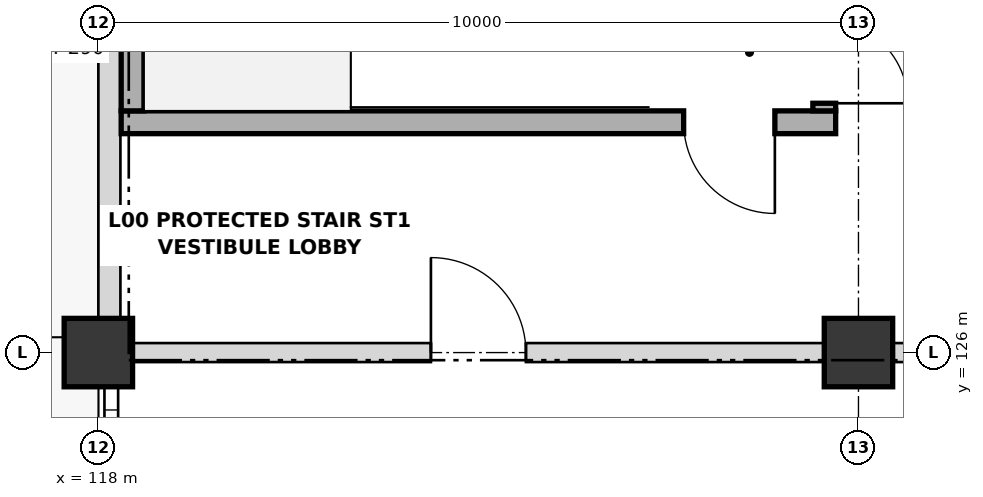
"""IFC4 building model, lengths in metres.
Left out: names, types, materials, properties, quantities, classifications, styles, units other than length and angle.
Written with IfcOpenShell. Run it as: python <this file> out.ifc"""

import sys

from ifc_helpers import new_model, si_unit, direction, frame, frame_2d, origin, origin_2d, place, context, subcontext, project, spatial, rectangle, extrude, element, fill, save


model = new_model("IFC4")
c1 = context("Model", 3, precision=1e-05, world=origin(), true_north=direction((0.0, 1.0)))
c2 = subcontext(c1, "Body", "Model", "MODEL_VIEW")
j1 = project(units=[si_unit("LENGTHUNIT", "METRE"), si_unit("PLANEANGLEUNIT", "RADIAN")], contexts=[c1])
p1 = place(None, origin())
s1 = spatial("IfcSite", under=j1, at=p1, CompositionType="ELEMENT")
p2 = place(p1, origin())
s2 = spatial("IfcBuilding", under=s1, at=p2, CompositionType="ELEMENT")
p3 = place(p2, origin())
s3 = spatial("IfcBuildingStorey", under=s2, at=p3, CompositionType="ELEMENT", Elevation=0.0)
for number, where, z_axis, x_axis in (
    (1, (118.0, 126.0, 0.0), (0.0, 0.0, 1.0), (1.0, 0.0, 0.0)),
    (2, (128.0, 126.0, 0.0), (0.0, 0.0, 1.0), (1.0, 0.0, 0.0)),
):
    element("IfcColumn", number, at=place(p3, frame(where, z_axis=z_axis, x_axis=x_axis)), inside=s3, PredefinedType="COLUMN", context=c2, shape_type="SweptSolid", body=[
        extrude(rectangle(XDim=0.9, YDim=0.9, at=origin_2d()), origin(), (0.0, 0.0, 1.0), 5.4),
    ])
p4 = place(p3, frame((118.145, 126.445, 0.0), z_axis=(0.0, 0.0, 1.0), x_axis=(0.0, 1.0, 0.0)))
e3 = element("IfcWall", 3, at=p4, inside=s3, PredefinedType="SOLIDWALL", context=c2, shape_type="SweptSolid", body=[
    extrude(rectangle(XDim=7.11, YDim=0.29, at=frame_2d((3.555, 0.0))), origin(), (0.0, 0.0, 1.0), 4.458),
])
p5 = place(p3, frame((127.7, 129.03, 0.0), z_axis=(0.0, 0.0, 1.0), x_axis=(-1.0, 0.0, 0.0)))
e4 = element("IfcWall", 4, at=p5, inside=s3, PredefinedType="SHEAR", context=c2, shape_type="SweptSolid", body=[
    extrude(rectangle(XDim=9.4, YDim=0.3, at=frame_2d((4.7, 0.0))), origin(), (0.0, 0.0, 1.0), 5.4),
])
p6 = place(p5, frame((0.8, 0.0, 0.0)))
e5 = element("IfcOpeningElement", 5, at=p6, cuts=e4, PredefinedType="OPENING", context=c2, shape_type="SweptSolid", body=[
    extrude(rectangle(XDim=1.2, YDim=2.15, at=frame_2d((0.6, 1.075))), frame((0.0, 0.16, 0.0), z_axis=(0.0, -1.0, 0.0), x_axis=(1.0, 0.0, 0.0)), (0.0, 0.0, 1.0), 0.32),
])
p7 = place(p3, frame((127.55, 133.68, 0.0), z_axis=(0.0, 0.0, 1.0), x_axis=(0.0, -1.0, 0.0)))
e6 = element("IfcWall", 6, at=p7, inside=s3, PredefinedType="SHEAR", context=c2, shape_type="SweptSolid", body=[
    extrude(rectangle(XDim=4.5, YDim=0.3, at=frame_2d((2.25, 0.0))), origin(), (0.0, 0.0, 1.0), 5.4),
])
p8 = place(p7, frame((3.3, 0.0, 0.0)))
e7 = element("IfcOpeningElement", 7, at=p8, cuts=e6, PredefinedType="OPENING", context=c2, shape_type="SweptSolid", body=[
    extrude(rectangle(XDim=1.1, YDim=2.15, at=frame_2d((0.55, 1.075))), frame((0.0, 0.16, 0.0), z_axis=(0.0, -1.0, 0.0), x_axis=(1.0, 0.0, 0.0)), (0.0, 0.0, 1.0), 0.32),
])
p9 = place(p3, frame((118.45, 129.18, 0.0), z_axis=(0.0, 0.0, 1.0), x_axis=(0.0, 1.0, 0.0)))
e8 = element("IfcWall", 8, at=p9, inside=s3, PredefinedType="SHEAR", context=c2, shape_type="SweptSolid", body=[
    extrude(rectangle(XDim=4.5, YDim=0.3, at=frame_2d((2.25, 0.0))), origin(), (0.0, 0.0, 1.0), 5.4),
])
p10 = place(p3, frame((118.455, 126.0, 0.0), z_axis=(0.0, 0.0, 1.0), x_axis=(1.0, 0.0, 0.0)))
e9 = element("IfcWall", 9, at=p10, inside=s3, PredefinedType="PARTITIONING", context=c2, shape_type="SweptSolid", body=[
    extrude(rectangle(XDim=9.09, YDim=0.25, at=frame_2d((4.545, 0.0))), origin(), (0.0, 0.0, 1.0), 4.258),
])
p11 = place(p10, frame((3.92, 0.0, 0.0)))
e10 = element("IfcOpeningElement", 10, at=p11, cuts=e9, PredefinedType="OPENING", context=c2, shape_type="SweptSolid", body=[
    extrude(rectangle(XDim=1.25, YDim=2.15, at=frame_2d((0.625, 1.075))), frame((0.0, 0.135, 0.0), z_axis=(0.0, -1.0, 0.0), x_axis=(1.0, 0.0, 0.0)), (0.0, 0.0, 1.0), 0.27),
])
p12 = place(p3, frame((128.455, 126.0, 0.0), z_axis=(0.0, 0.0, 1.0), x_axis=(1.0, 0.0, 0.0)))
e11 = element("IfcWall", 11, at=p12, inside=s3, PredefinedType="PARTITIONING", context=c2, shape_type="SweptSolid", body=[
    extrude(rectangle(XDim=9.09, YDim=0.25, at=frame_2d((4.545, 0.0))), origin(), (0.0, 0.0, 1.0), 4.258),
])
p13 = place(p12, frame((1.72, 0.0, 0.0)))
e12 = element("IfcOpeningElement", 12, at=p13, cuts=e11, PredefinedType="OPENING", context=c2, shape_type="SweptSolid", body=[
    extrude(rectangle(XDim=1.25, YDim=2.15, at=frame_2d((0.625, 1.075))), frame((0.0, 0.135, 0.0), z_axis=(0.0, -1.0, 0.0), x_axis=(1.0, 0.0, 0.0)), (0.0, 0.0, 1.0), 0.27),
])
p14 = place(p12, frame((6.195, 0.0, 0.0)))
e13 = element("IfcOpeningElement", 13, at=p14, cuts=e11, PredefinedType="OPENING", context=c2, shape_type="SweptSolid", body=[
    extrude(rectangle(XDim=1.1, YDim=2.15, at=frame_2d((0.55, 1.075))), frame((0.0, 0.135, 0.0), z_axis=(0.0, -1.0, 0.0), x_axis=(1.0, 0.0, 0.0)), (0.0, 0.0, 1.0), 0.27),
])
p15 = place(p6, origin())
e14 = element("IfcDoor", 14, at=p15, inside=s3, OperationType="SINGLE_SWING_LEFT", PredefinedType="DOOR", context=c2, shape_type="SweptSolid", body=[
    extrude(rectangle(XDim=1.2, YDim=2.15, at=frame_2d((0.6, 1.075))), frame((0.0, 0.025, 0.0), z_axis=(0.0, -1.0, 0.0), x_axis=(1.0, 0.0, 0.0)), (0.0, 0.0, 1.0), 0.05),
])
fill(e5, e14)
p16 = place(p8, origin())
e15 = element("IfcDoor", 15, at=p16, inside=s3, OperationType="SINGLE_SWING_RIGHT", PredefinedType="DOOR", context=c2, shape_type="SweptSolid", body=[
    extrude(rectangle(XDim=1.1, YDim=2.15, at=frame_2d((0.55, 1.075))), frame((0.0, 0.025, 0.0), z_axis=(0.0, -1.0, 0.0), x_axis=(1.0, 0.0, 0.0)), (0.0, 0.0, 1.0), 0.05),
])
fill(e7, e15)
p17 = place(p11, origin())
e16 = element("IfcDoor", 16, at=p17, inside=s3, OperationType="SINGLE_SWING_LEFT", PredefinedType="DOOR", context=c2, shape_type="SweptSolid", body=[
    extrude(rectangle(XDim=1.25, YDim=2.15, at=frame_2d((0.625, 1.075))), frame((0.0, 0.025, 0.0), z_axis=(0.0, -1.0, 0.0), x_axis=(1.0, 0.0, 0.0)), (0.0, 0.0, 1.0), 0.05),
])
fill(e10, e16)
save(model, sys.argv[1])
